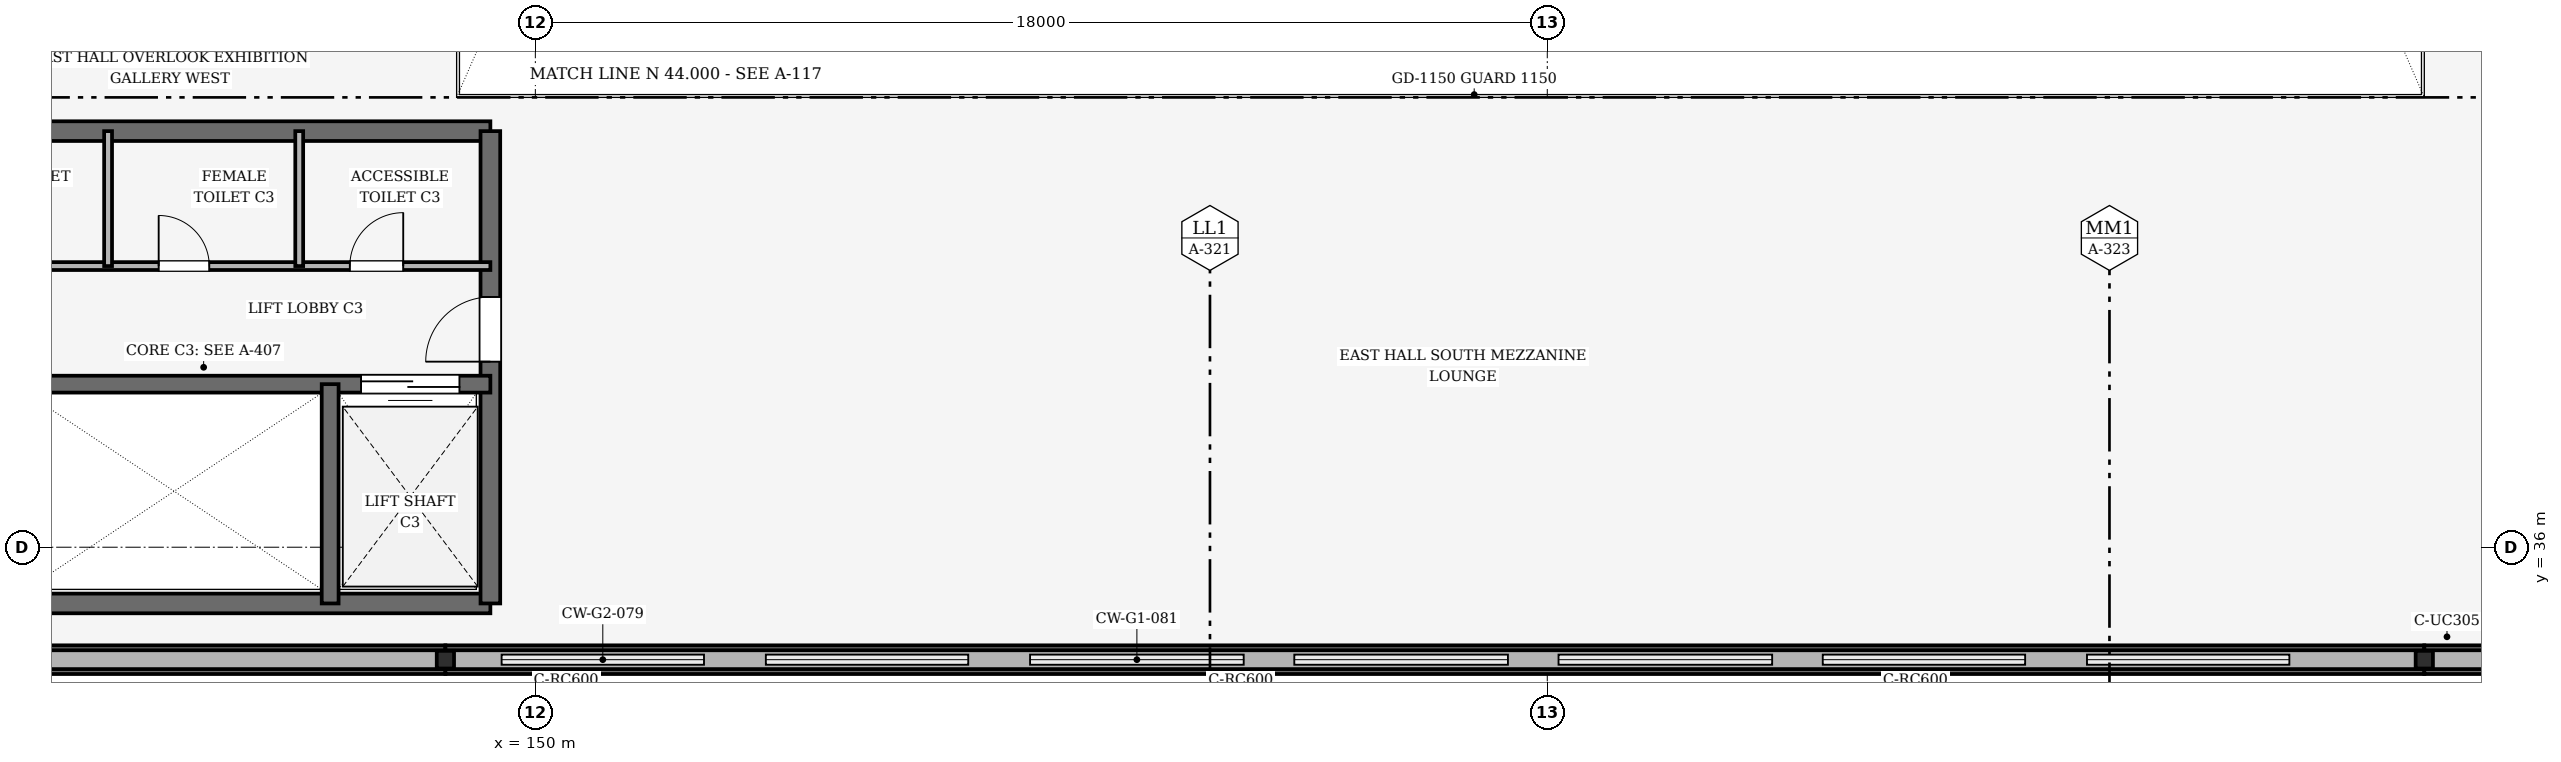
"""IFC4 building model, lengths in metres.
Left out: names, types, materials, properties, quantities, classifications, styles, units other than length and angle.
Written with IfcOpenShell. Run it as: python <this file> out.ifc"""

import sys

from ifc_helpers import new_model, si_unit, direction, frame, frame_2d, origin, origin_2d, place, context, subcontext, project, spatial, rectangle, i_section, extrude, element, fill, save


model = new_model("IFC4")
c1 = context("Model", 3, precision=1e-05, world=origin(), true_north=direction((0.0, 1.0)))
c2 = subcontext(c1, "Body", "Model", "MODEL_VIEW")
j1 = project(units=[si_unit("LENGTHUNIT", "METRE"), si_unit("PLANEANGLEUNIT", "RADIAN")], contexts=[c1])
p1 = place(None, origin())
s1 = spatial("IfcSite", under=j1, at=p1, CompositionType="ELEMENT")
p2 = place(p1, origin())
s2 = spatial("IfcBuilding", under=s1, at=p2, CompositionType="ELEMENT")
p3 = place(p2, frame((0.0, 0.0, 5.4)))
s3 = spatial("IfcBuildingStorey", under=s2, at=p3, CompositionType="ELEMENT", Elevation=5.4)
for number, where, z_axis, x_axis in (
    (1, (148.4, 34.0, 0.0), (0.0, 0.0, 1.0), (1.0, 0.0, 0.0)),
    (2, (183.6, 34.0, 0.0), (0.0, 0.0, 1.0), (1.0, 0.0, 0.0)),
):
    element("IfcColumn", number, at=place(p3, frame(where, z_axis=z_axis, x_axis=x_axis)), inside=s3, PredefinedType="COLUMN", context=c2, shape_type="SweptSolid", body=[
        extrude(i_section(OverallWidth=0.307, OverallDepth=0.314, WebThickness=0.012, FlangeThickness=0.019, FilletRadius=0.015, at=origin_2d()), origin(), (0.0, 0.0, 1.0), 6.5),
    ])
p4 = place(p3, frame((138.0, 34.0, 0.0), z_axis=(0.0, 0.0, 1.0), x_axis=(1.0, 0.0, 0.0)))
e3 = element("IfcWall", 3, at=p4, inside=s3, PredefinedType="SOLIDWALL", context=c2, shape_type="SweptSolid", body=[
    extrude(rectangle(XDim=10.4, YDim=0.51, at=frame_2d((5.2, 0.0))), origin(), (0.0, 0.0, 1.0), 6.4),
])
p5 = place(p3, frame((148.4, 34.0, 0.0), z_axis=(0.0, 0.0, 1.0), x_axis=(1.0, 0.0, 0.0)))
e4 = element("IfcWall", 4, at=p5, inside=s3, PredefinedType="SOLIDWALL", context=c2, shape_type="SweptSolid", body=[
    extrude(rectangle(XDim=35.2, YDim=0.51, at=frame_2d((17.6, 0.0))), origin(), (0.0, 0.0, 1.0), 1.05),
])
p6 = place(p3, frame((183.6, 34.0, 0.0), z_axis=(0.0, 0.0, 1.0), x_axis=(1.0, 0.0, 0.0)))
e5 = element("IfcWall", 5, at=p6, inside=s3, PredefinedType="SOLIDWALL", context=c2, shape_type="SweptSolid", body=[
    extrude(rectangle(XDim=8.4, YDim=0.51, at=frame_2d((4.2, 0.0))), origin(), (0.0, 0.0, 1.0), 6.4),
])
p7 = place(p3, frame((138.0, 34.0, 6.4), z_axis=(0.0, 0.0, 1.0), x_axis=(1.0, 0.0, 0.0)))
e6 = element("IfcWall", 6, at=p7, inside=s3, PredefinedType="SOLIDWALL", context=c2, shape_type="SweptSolid", body=[
    extrude(rectangle(XDim=10.4, YDim=0.335, at=frame_2d((5.2, 0.0))), origin(), (0.0, 0.0, 1.0), 2.118),
])
p8 = place(p3, frame((183.6, 34.0, 6.4), z_axis=(0.0, 0.0, 1.0), x_axis=(1.0, 0.0, 0.0)))
e7 = element("IfcWall", 7, at=p8, inside=s3, PredefinedType="SOLIDWALL", context=c2, shape_type="SweptSolid", body=[
    extrude(rectangle(XDim=8.4, YDim=0.335, at=frame_2d((4.2, 0.0))), origin(), (0.0, 0.0, 1.0), 2.118),
])
p9 = place(p3, frame((148.4, 34.0, 6.45), z_axis=(0.0, 0.0, 1.0), x_axis=(1.0, 0.0, 0.0)))
e8 = element("IfcWall", 8, at=p9, inside=s3, PredefinedType="SOLIDWALL", context=c2, shape_type="SweptSolid", body=[
    extrude(rectangle(XDim=35.2, YDim=0.335, at=frame_2d((17.6, 0.0))), origin(), (0.0, 0.0, 1.0), 3.15),
])
for number, where, z_axis, x_axis in (
    (9, (139.0, 35.0, 0.0), (0.0, 0.0, 1.0), (1.0, 0.0, 0.0)),
    (10, (149.2, 43.4, 0.0), (0.0, 0.0, 1.0), (-1.0, 0.0, 0.0)),
):
    element("IfcWall", number, at=place(p3, frame(where, z_axis=z_axis, x_axis=x_axis)), inside=s3, PredefinedType="SHEAR", context=c2, shape_type="SweptSolid", body=[
        extrude(rectangle(XDim=10.2, YDim=0.35, at=frame_2d((5.1, 0.0))), origin(), (0.0, 0.0, 1.0), 5.4),
    ])
p10 = place(p3, frame((149.2, 35.0, 0.0), z_axis=(0.0, 0.0, 1.0), x_axis=(0.0, 1.0, 0.0)))
e11 = element("IfcWall", 11, at=p10, inside=s3, PredefinedType="SHEAR", context=c2, shape_type="SweptSolid", body=[
    extrude(rectangle(XDim=8.4, YDim=0.35, at=frame_2d((4.2, 0.0))), origin(), (0.0, 0.0, 1.0), 5.4),
])
p11 = place(p10, frame((4.3, 0.0, 0.0)))
e12 = element("IfcOpeningElement", 12, at=p11, cuts=e11, PredefinedType="OPENING", context=c2, shape_type="SweptSolid", body=[
    extrude(rectangle(XDim=1.15, YDim=2.15, at=frame_2d((0.575, 1.075))), frame((0.0, 0.185, 0.0), z_axis=(0.0, -1.0, 0.0), x_axis=(1.0, 0.0, 0.0)), (0.0, 0.0, 1.0), 0.37),
])
p12 = place(p3, frame((139.0, 38.9, 0.0), z_axis=(0.0, 0.0, 1.0), x_axis=(1.0, 0.0, 0.0)))
e13 = element("IfcWall", 13, at=p12, inside=s3, PredefinedType="SHEAR", context=c2, shape_type="SweptSolid", body=[
    extrude(rectangle(XDim=10.2, YDim=0.3, at=frame_2d((5.1, 0.0))), origin(), (0.0, 0.0, 1.0), 5.4),
])
p13 = place(p12, frame((0.28, 0.0, 0.0)))
e14 = element("IfcOpeningElement", 14, at=p13, cuts=e13, PredefinedType="OPENING", context=c2, shape_type="SweptSolid", body=[
    extrude(rectangle(XDim=1.45, YDim=2.15, at=frame_2d((0.725, 1.075))), frame((0.0, 0.16, 0.0), z_axis=(0.0, -1.0, 0.0), x_axis=(1.0, 0.0, 0.0)), (0.0, 0.0, 1.0), 0.32),
])
p14 = place(p12, frame((7.9, 0.0, 0.0)))
e15 = element("IfcOpeningElement", 15, at=p14, cuts=e13, PredefinedType="OPENING", context=c2, shape_type="SweptSolid", body=[
    extrude(rectangle(XDim=1.75, YDim=2.3, at=frame_2d((0.875, 1.15))), frame((0.0, 0.16, 0.0), z_axis=(0.0, -1.0, 0.0), x_axis=(1.0, 0.0, 0.0)), (0.0, 0.0, 1.0), 0.32),
])
p15 = place(p3, frame((146.35, 35.0, 0.0), z_axis=(0.0, 0.0, 1.0), x_axis=(0.0, 1.0, 0.0)))
e16 = element("IfcWall", 16, at=p15, inside=s3, PredefinedType="SHEAR", context=c2, shape_type="SweptSolid", body=[
    extrude(rectangle(XDim=3.9, YDim=0.3, at=frame_2d((1.95, 0.0))), origin(), (0.0, 0.0, 1.0), 5.4),
])
p16 = place(p3, frame((139.0, 41.0, 0.0), z_axis=(0.0, 0.0, 1.0), x_axis=(1.0, 0.0, 0.0)))
e17 = element("IfcWall", 17, at=p16, inside=s3, PredefinedType="PARTITIONING", context=c2, shape_type="SweptSolid", body=[
    extrude(rectangle(XDim=10.2, YDim=0.14, at=frame_2d((5.1, 0.0))), origin(), (0.0, 0.0, 1.0), 4.5),
])
p17 = place(p16, frame((0.9, 0.0, 0.0)))
e18 = element("IfcOpeningElement", 18, at=p17, cuts=e17, PredefinedType="OPENING", context=c2, shape_type="SweptSolid", body=[
    extrude(rectangle(XDim=0.9, YDim=2.1, at=frame_2d((0.45, 1.05))), frame((0.0, 0.08, 0.0), z_axis=(0.0, -1.0, 0.0), x_axis=(1.0, 0.0, 0.0)), (0.0, 0.0, 1.0), 0.16),
])
p18 = place(p16, frame((4.3, 0.0, 0.0)))
e19 = element("IfcOpeningElement", 19, at=p18, cuts=e17, PredefinedType="OPENING", context=c2, shape_type="SweptSolid", body=[
    extrude(rectangle(XDim=0.9, YDim=2.1, at=frame_2d((0.45, 1.05))), frame((0.0, 0.08, 0.0), z_axis=(0.0, -1.0, 0.0), x_axis=(1.0, 0.0, 0.0)), (0.0, 0.0, 1.0), 0.16),
])
p19 = place(p16, frame((7.7, 0.0, 0.0)))
e20 = element("IfcOpeningElement", 20, at=p19, cuts=e17, PredefinedType="OPENING", context=c2, shape_type="SweptSolid", body=[
    extrude(rectangle(XDim=0.95, YDim=2.1, at=frame_2d((0.475, 1.05))), frame((0.0, 0.08, 0.0), z_axis=(0.0, -1.0, 0.0), x_axis=(1.0, 0.0, 0.0)), (0.0, 0.0, 1.0), 0.16),
])
for number, where, z_axis, x_axis in (
    (21, (142.4, 41.0, 0.0), (0.0, 0.0, 1.0), (0.0, 1.0, 0.0)),
    (22, (145.8, 41.0, 0.0), (0.0, 0.0, 1.0), (0.0, 1.0, 0.0)),
):
    element("IfcWall", number, at=place(p3, frame(where, z_axis=z_axis, x_axis=x_axis)), inside=s3, PredefinedType="PARTITIONING", context=c2, shape_type="SweptSolid", body=[
        extrude(rectangle(XDim=2.4, YDim=0.14, at=frame_2d((1.2, 0.0))), origin(), (0.0, 0.0, 1.0), 4.5),
    ])
p20 = place(p11, origin())
e23 = element("IfcDoor", 23, at=p20, inside=s3, OperationType="SINGLE_SWING_LEFT", PredefinedType="DOOR", context=c2, shape_type="SweptSolid", body=[
    extrude(rectangle(XDim=1.15, YDim=2.15, at=frame_2d((0.575, 1.075))), frame((0.0, 0.025, 0.0), z_axis=(0.0, -1.0, 0.0), x_axis=(1.0, 0.0, 0.0)), (0.0, 0.0, 1.0), 0.05),
])
fill(e12, e23)
p21 = place(p14, origin())
e24 = element("IfcDoor", 24, at=p21, inside=s3, OperationType="DOUBLE_DOOR_SLIDING", PredefinedType="DOOR", context=c2, shape_type="SweptSolid", body=[
    extrude(rectangle(XDim=1.75, YDim=2.3, at=frame_2d((0.875, 1.15))), frame((0.0, 0.025, 0.0), z_axis=(0.0, -1.0, 0.0), x_axis=(1.0, 0.0, 0.0)), (0.0, 0.0, 1.0), 0.05),
])
fill(e15, e24)
p22 = place(p18, origin())
e25 = element("IfcDoor", 25, at=p22, inside=s3, OperationType="SINGLE_SWING_LEFT", PredefinedType="DOOR", context=c2, shape_type="SweptSolid", body=[
    extrude(rectangle(XDim=0.9, YDim=2.1, at=frame_2d((0.45, 1.05))), frame((0.0, 0.025, 0.0), z_axis=(0.0, -1.0, 0.0), x_axis=(1.0, 0.0, 0.0)), (0.0, 0.0, 1.0), 0.05),
])
fill(e19, e25)
p23 = place(p19, origin())
e26 = element("IfcDoor", 26, at=p23, inside=s3, OperationType="SINGLE_SWING_RIGHT", PredefinedType="DOOR", context=c2, shape_type="SweptSolid", body=[
    extrude(rectangle(XDim=0.95, YDim=2.1, at=frame_2d((0.475, 1.05))), frame((0.0, 0.025, 0.0), z_axis=(0.0, -1.0, 0.0), x_axis=(1.0, 0.0, 0.0)), (0.0, 0.0, 1.0), 0.05),
])
fill(e20, e26)
save(model, sys.argv[1])
